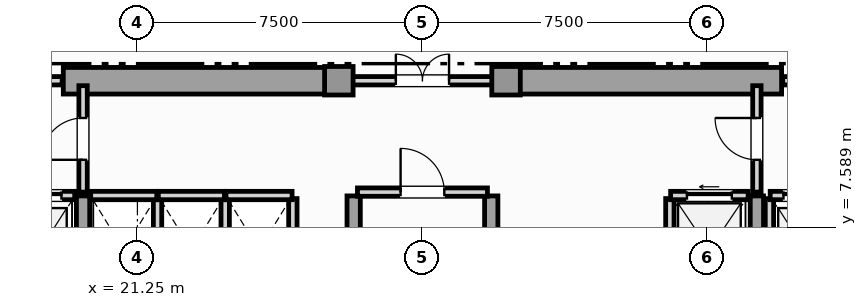
"""IFC4 building model, lengths in metres.
Left out: names, types, materials, properties, quantities, classifications, styles, units other than length and angle.
Written with IfcOpenShell. Run it as: python <this file> out.ifc"""

import sys

from ifc_helpers import new_model, si_unit, direction, frame, frame_2d, origin, origin_2d, place, context, subcontext, project, spatial, rectangle, extrude, element, fill, save


model = new_model("IFC4")
c1 = context("Model", 3, precision=1e-05, world=origin(), true_north=direction((0.0, 1.0)))
c2 = subcontext(c1, "Body", "Model", "MODEL_VIEW")
j1 = project(units=[si_unit("LENGTHUNIT", "METRE"), si_unit("PLANEANGLEUNIT", "RADIAN")], contexts=[c1])
p1 = place(None, origin())
s1 = spatial("IfcSite", under=j1, at=p1, CompositionType="ELEMENT")
p2 = place(p1, origin())
s2 = spatial("IfcBuilding", under=s1, at=p2, CompositionType="ELEMENT")
p3 = place(p2, frame((0.0, 0.0, 145.2)))
s3 = spatial("IfcBuildingStorey", under=s2, at=p3, CompositionType="ELEMENT", Elevation=145.2)
for number, where, z_axis, x_axis in (
    (1, (19.3, 11.45, 0.0), (0.0, 0.0, 1.0), (1.0, 0.0, 0.0)),
    (2, (30.9, 11.45, 0.0), (0.0, 0.0, 1.0), (1.0, 0.0, 0.0)),
):
    element("IfcWall", number, at=place(p3, frame(where, z_axis=z_axis, x_axis=x_axis)), inside=s3, PredefinedType="SHEAR", context=c2, shape_type="SweptSolid", body=[
        extrude(rectangle(XDim=7.3, YDim=0.7, at=frame_2d((3.65, 0.0))), origin(), (0.0, 0.0, 1.0), 3.63),
    ])
for number, where, z_axis, x_axis in (
    (3, (19.82, 0.92, 0.0), (0.0, 0.0, 1.0), (0.0, 1.0, 0.0)),
    (4, (26.94, 0.92, 0.0), (0.0, 0.0, 1.0), (0.0, 1.0, 0.0)),
    (5, (30.56, 0.92, 0.0), (0.0, 0.0, 1.0), (0.0, 1.0, 0.0)),
    (6, (37.55, 0.92, 0.0), (0.0, 0.0, 1.0), (0.0, 1.0, 0.0)),
):
    element("IfcWall", number, at=place(p3, frame(where, z_axis=z_axis, x_axis=x_axis)), inside=s3, PredefinedType="SHEAR", context=c2, shape_type="SweptSolid", body=[
        extrude(rectangle(XDim=7.5, YDim=0.35, at=frame_2d((3.75, 0.0))), origin(), (0.0, 0.0, 1.0), 3.63),
    ])
for number, where, z_axis, x_axis in (
    (7, (26.55, 11.45, 0.0), (0.0, 0.0, 1.0), (1.0, 0.0, 0.0)),
    (8, (30.95, 11.45, 0.0), (0.0, 0.0, 1.0), (1.0, 0.0, 0.0)),
):
    element("IfcColumn", number, at=place(p3, frame(where, z_axis=z_axis, x_axis=x_axis)), inside=s3, PredefinedType="COLUMN", context=c2, shape_type="SweptSolid", body=[
        extrude(rectangle(XDim=0.75, YDim=0.75, at=origin_2d()), origin(), (0.0, 0.0, 1.0), 3.85),
    ])
p4 = place(p3, frame((17.78, 8.43, 0.0), z_axis=(0.0, 0.0, 1.0), x_axis=(1.0, 0.0, 0.0)))
e9 = element("IfcWall", 9, at=p4, inside=s3, PredefinedType="SOLIDWALL", context=c2, shape_type="SweptSolid", body=[
    extrude(rectangle(XDim=1.82, YDim=0.22, at=frame_2d((0.91, 0.0))), origin(), (0.0, 0.0, 1.0), 3.63),
])
p5 = place(p4, frame((0.35, 0.0, 0.0)))
e10 = element("IfcOpeningElement", 10, at=p5, cuts=e9, PredefinedType="OPENING", context=c2, shape_type="SweptSolid", body=[
    extrude(rectangle(XDim=1.12, YDim=2.25, at=frame_2d((0.56, 1.125))), frame((0.0, 0.12, 0.0), z_axis=(0.0, -1.0, 0.0), x_axis=(1.0, 0.0, 0.0)), (0.0, 0.0, 1.0), 0.24),
])
p6 = place(p3, frame((37.88, 5.65, 0.0), z_axis=(0.0, 0.0, 1.0), x_axis=(0.0, 1.0, 0.0)))
e11 = element("IfcWall", 11, at=p6, inside=s3, PredefinedType="SOLIDWALL", context=c2, shape_type="SweptSolid", body=[
    extrude(rectangle(XDim=2.7, YDim=0.22, at=frame_2d((1.35, 0.0))), origin(), (0.0, 0.0, 1.0), 3.63),
])
p7 = place(p3, frame((37.9, 8.43, 0.0), z_axis=(0.0, 0.0, 1.0), x_axis=(1.0, 0.0, 0.0)))
e12 = element("IfcWall", 12, at=p7, inside=s3, PredefinedType="SOLIDWALL", context=c2, shape_type="SweptSolid", body=[
    extrude(rectangle(XDim=1.82, YDim=0.22, at=frame_2d((0.91, 0.0))), origin(), (0.0, 0.0, 1.0), 3.63),
])
p8 = place(p7, frame((0.35, 0.0, 0.0)))
e13 = element("IfcOpeningElement", 13, at=p8, cuts=e12, PredefinedType="OPENING", context=c2, shape_type="SweptSolid", body=[
    extrude(rectangle(XDim=1.12, YDim=2.25, at=frame_2d((0.56, 1.125))), frame((0.0, 0.12, 0.0), z_axis=(0.0, -1.0, 0.0), x_axis=(1.0, 0.0, 0.0)), (0.0, 0.0, 1.0), 0.24),
])
p9 = place(p3, frame((35.26, 5.65, 0.0), z_axis=(0.0, 0.0, 1.0), x_axis=(0.0, 1.0, 0.0)))
e14 = element("IfcWall", 14, at=p9, inside=s3, PredefinedType="SOLIDWALL", context=c2, shape_type="SweptSolid", body=[
    extrude(rectangle(XDim=2.7, YDim=0.22, at=frame_2d((1.35, 0.0))), origin(), (0.0, 0.0, 1.0), 3.63),
])
p10 = place(p3, frame((35.28, 8.43, 0.0), z_axis=(0.0, 0.0, 1.0), x_axis=(1.0, 0.0, 0.0)))
e15 = element("IfcWall", 15, at=p10, inside=s3, PredefinedType="SOLIDWALL", context=c2, shape_type="SweptSolid", body=[
    extrude(rectangle(XDim=2.04, YDim=0.22, at=frame_2d((1.02, 0.0))), origin(), (0.0, 0.0, 1.0), 3.63),
])
p11 = place(p10, frame((0.43, 0.0, 0.0)))
e16 = element("IfcOpeningElement", 16, at=p11, cuts=e15, PredefinedType="OPENING", context=c2, shape_type="SweptSolid", body=[
    extrude(rectangle(XDim=1.18, YDim=2.2, at=frame_2d((0.59, 1.1))), frame((0.0, 0.12, 0.0), z_axis=(0.0, -1.0, 0.0), x_axis=(1.0, 0.0, 0.0)), (0.0, 0.0, 1.0), 0.24),
])
p12 = place(p3, frame((21.78, 5.65, 0.0), z_axis=(0.0, 0.0, 1.0), x_axis=(0.0, 1.0, 0.0)))
e17 = element("IfcWall", 17, at=p12, inside=s3, PredefinedType="SOLIDWALL", context=c2, shape_type="SweptSolid", body=[
    extrude(rectangle(XDim=2.7, YDim=0.22, at=frame_2d((1.35, 0.0))), origin(), (0.0, 0.0, 1.0), 3.63),
])
p13 = place(p3, frame((20.02, 8.43, 0.0), z_axis=(0.0, 0.0, 1.0), x_axis=(1.0, 0.0, 0.0)))
e18 = element("IfcWall", 18, at=p13, inside=s3, PredefinedType="SOLIDWALL", context=c2, shape_type="SweptSolid", body=[
    extrude(rectangle(XDim=1.74, YDim=0.22, at=frame_2d((0.87, 0.0))), origin(), (0.0, 0.0, 1.0), 3.63),
])
p14 = place(p3, frame((23.56, 5.65, 0.0), z_axis=(0.0, 0.0, 1.0), x_axis=(0.0, 1.0, 0.0)))
e19 = element("IfcWall", 19, at=p14, inside=s3, PredefinedType="SOLIDWALL", context=c2, shape_type="SweptSolid", body=[
    extrude(rectangle(XDim=2.7, YDim=0.22, at=frame_2d((1.35, 0.0))), origin(), (0.0, 0.0, 1.0), 3.63),
])
p15 = place(p3, frame((21.8, 8.43, 0.0), z_axis=(0.0, 0.0, 1.0), x_axis=(1.0, 0.0, 0.0)))
e20 = element("IfcWall", 20, at=p15, inside=s3, PredefinedType="SOLIDWALL", context=c2, shape_type="SweptSolid", body=[
    extrude(rectangle(XDim=1.74, YDim=0.22, at=frame_2d((0.87, 0.0))), origin(), (0.0, 0.0, 1.0), 3.63),
])
p16 = place(p3, frame((25.34, 5.65, 0.0), z_axis=(0.0, 0.0, 1.0), x_axis=(0.0, 1.0, 0.0)))
e21 = element("IfcWall", 21, at=p16, inside=s3, PredefinedType="SOLIDWALL", context=c2, shape_type="SweptSolid", body=[
    extrude(rectangle(XDim=2.7, YDim=0.22, at=frame_2d((1.35, 0.0))), origin(), (0.0, 0.0, 1.0), 3.63),
])
p17 = place(p3, frame((23.58, 8.43, 0.0), z_axis=(0.0, 0.0, 1.0), x_axis=(1.0, 0.0, 0.0)))
e22 = element("IfcWall", 22, at=p17, inside=s3, PredefinedType="SOLIDWALL", context=c2, shape_type="SweptSolid", body=[
    extrude(rectangle(XDim=1.74, YDim=0.22, at=frame_2d((0.87, 0.0))), origin(), (0.0, 0.0, 1.0), 3.63),
])
p18 = place(p3, frame((27.04, 8.52, 0.0), z_axis=(0.0, 0.0, 1.0), x_axis=(1.0, 0.0, 0.0)))
e23 = element("IfcWall", 23, at=p18, inside=s3, PredefinedType="SOLIDWALL", context=c2, shape_type="SweptSolid", body=[
    extrude(rectangle(XDim=3.42, YDim=0.22, at=frame_2d((1.71, 0.0))), origin(), (0.0, 0.0, 1.0), 3.63),
])
p19 = place(p18, frame((1.135, 0.0, 0.0)))
e24 = element("IfcOpeningElement", 24, at=p19, cuts=e23, PredefinedType="OPENING", context=c2, shape_type="SweptSolid", body=[
    extrude(rectangle(XDim=1.15, YDim=2.2, at=frame_2d((0.575, 1.1))), frame((0.0, 0.12, 0.0), z_axis=(0.0, -1.0, 0.0), x_axis=(1.0, 0.0, 0.0)), (0.0, 0.0, 1.0), 0.24),
])
p20 = place(p3, frame((19.82, 8.52, 0.0), z_axis=(0.0, 0.0, 1.0), x_axis=(0.0, 1.0, 0.0)))
e25 = element("IfcWall", 25, at=p20, inside=s3, PredefinedType="SOLIDWALL", context=c2, shape_type="SweptSolid", body=[
    extrude(rectangle(XDim=2.8, YDim=0.22, at=frame_2d((1.4, 0.0))), origin(), (0.0, 0.0, 1.0), 3.085),
])
p21 = place(p20, frame((0.85, 0.0, 0.0)))
e26 = element("IfcOpeningElement", 26, at=p21, cuts=e25, PredefinedType="OPENING", context=c2, shape_type="SweptSolid", body=[
    extrude(rectangle(XDim=1.1, YDim=2.2, at=frame_2d((0.55, 1.1))), frame((0.0, 0.12, 0.0), z_axis=(0.0, -1.0, 0.0), x_axis=(1.0, 0.0, 0.0)), (0.0, 0.0, 1.0), 0.24),
])
p22 = place(p3, frame((37.55, 8.52, 0.0), z_axis=(0.0, 0.0, 1.0), x_axis=(0.0, 1.0, 0.0)))
e27 = element("IfcWall", 27, at=p22, inside=s3, PredefinedType="SOLIDWALL", context=c2, shape_type="SweptSolid", body=[
    extrude(rectangle(XDim=2.8, YDim=0.22, at=frame_2d((1.4, 0.0))), origin(), (0.0, 0.0, 1.0), 3.085),
])
p23 = place(p22, frame((0.85, 0.0, 0.0)))
e28 = element("IfcOpeningElement", 28, at=p23, cuts=e27, PredefinedType="OPENING", context=c2, shape_type="SweptSolid", body=[
    extrude(rectangle(XDim=1.1, YDim=2.2, at=frame_2d((0.55, 1.1))), frame((0.0, 0.12, 0.0), z_axis=(0.0, -1.0, 0.0), x_axis=(1.0, 0.0, 0.0)), (0.0, 0.0, 1.0), 0.24),
])
p24 = place(p3, frame((16.23, 11.45, 0.0), z_axis=(0.0, 0.0, 1.0), x_axis=(1.0, 0.0, 0.0)))
e29 = element("IfcWall", 29, at=p24, inside=s3, PredefinedType="SOLIDWALL", context=c2, shape_type="SweptSolid", body=[
    extrude(rectangle(XDim=3.04, YDim=0.22, at=frame_2d((1.52, 0.0))), origin(), (0.0, 0.0, 1.0), 3.63),
])
p25 = place(p24, frame((0.97, 0.0, 0.0)))
e30 = element("IfcOpeningElement", 30, at=p25, cuts=e29, PredefinedType="OPENING", context=c2, shape_type="SweptSolid", body=[
    extrude(rectangle(XDim=1.1, YDim=2.2, at=frame_2d((0.55, 1.1))), frame((0.0, 0.12, 0.0), z_axis=(0.0, -1.0, 0.0), x_axis=(1.0, 0.0, 0.0)), (0.0, 0.0, 1.0), 0.24),
])
p26 = place(p3, frame((26.63, 11.45, 0.0), z_axis=(0.0, 0.0, 1.0), x_axis=(1.0, 0.0, 0.0)))
e31 = element("IfcWall", 31, at=p26, inside=s3, PredefinedType="SOLIDWALL", context=c2, shape_type="SweptSolid", body=[
    extrude(rectangle(XDim=4.24, YDim=0.22, at=frame_2d((2.12, 0.0))), origin(), (0.0, 0.0, 1.0), 3.63),
])
p27 = place(p26, frame((1.42, 0.0, 0.0)))
e32 = element("IfcOpeningElement", 32, at=p27, cuts=e31, PredefinedType="OPENING", context=c2, shape_type="SweptSolid", body=[
    extrude(rectangle(XDim=1.4, YDim=2.2, at=frame_2d((0.7, 1.1))), frame((0.0, 0.12, 0.0), z_axis=(0.0, -1.0, 0.0), x_axis=(1.0, 0.0, 0.0)), (0.0, 0.0, 1.0), 0.24),
])
p28 = place(p3, frame((38.23, 11.45, 0.0), z_axis=(0.0, 0.0, 1.0), x_axis=(1.0, 0.0, 0.0)))
e33 = element("IfcWall", 33, at=p28, inside=s3, PredefinedType="SOLIDWALL", context=c2, shape_type="SweptSolid", body=[
    extrude(rectangle(XDim=3.04, YDim=0.22, at=frame_2d((1.52, 0.0))), origin(), (0.0, 0.0, 1.0), 3.63),
])
p29 = place(p28, frame((0.97, 0.0, 0.0)))
e34 = element("IfcOpeningElement", 34, at=p29, cuts=e33, PredefinedType="OPENING", context=c2, shape_type="SweptSolid", body=[
    extrude(rectangle(XDim=1.1, YDim=2.2, at=frame_2d((0.55, 1.1))), frame((0.0, 0.12, 0.0), z_axis=(0.0, -1.0, 0.0), x_axis=(1.0, 0.0, 0.0)), (0.0, 0.0, 1.0), 0.24),
])
p30 = place(p5, origin())
e35 = element("IfcDoor", 35, at=p30, inside=s3, OperationType="SLIDING_TO_LEFT", PredefinedType="DOOR", context=c2, shape_type="SweptSolid", body=[
    extrude(rectangle(XDim=1.12, YDim=2.25, at=frame_2d((0.56, 1.125))), frame((0.0, 0.025, 0.0), z_axis=(0.0, -1.0, 0.0), x_axis=(1.0, 0.0, 0.0)), (0.0, 0.0, 1.0), 0.05),
])
fill(e10, e35)
p31 = place(p8, origin())
e36 = element("IfcDoor", 36, at=p31, inside=s3, OperationType="SLIDING_TO_RIGHT", PredefinedType="DOOR", context=c2, shape_type="SweptSolid", body=[
    extrude(rectangle(XDim=1.12, YDim=2.25, at=frame_2d((0.56, 1.125))), frame((0.0, 0.025, 0.0), z_axis=(0.0, -1.0, 0.0), x_axis=(1.0, 0.0, 0.0)), (0.0, 0.0, 1.0), 0.05),
])
fill(e13, e36)
p32 = place(p11, origin())
e37 = element("IfcDoor", 37, at=p32, inside=s3, OperationType="SLIDING_TO_LEFT", PredefinedType="DOOR", context=c2, shape_type="SweptSolid", body=[
    extrude(rectangle(XDim=1.18, YDim=2.2, at=frame_2d((0.59, 1.1))), frame((0.0, 0.025, 0.0), z_axis=(0.0, -1.0, 0.0), x_axis=(1.0, 0.0, 0.0)), (0.0, 0.0, 1.0), 0.05),
])
fill(e16, e37)
p33 = place(p19, origin())
e38 = element("IfcDoor", 38, at=p33, inside=s3, OperationType="SINGLE_SWING_LEFT", PredefinedType="DOOR", context=c2, shape_type="SweptSolid", body=[
    extrude(rectangle(XDim=1.15, YDim=2.2, at=frame_2d((0.575, 1.1))), frame((0.0, 0.025, 0.0), z_axis=(0.0, -1.0, 0.0), x_axis=(1.0, 0.0, 0.0)), (0.0, 0.0, 1.0), 0.05),
])
fill(e24, e38)
p34 = place(p21, origin())
e39 = element("IfcDoor", 39, at=p34, inside=s3, OperationType="SINGLE_SWING_LEFT", PredefinedType="DOOR", context=c2, shape_type="SweptSolid", body=[
    extrude(rectangle(XDim=1.1, YDim=2.2, at=frame_2d((0.55, 1.1))), frame((0.0, 0.025, 0.0), z_axis=(0.0, -1.0, 0.0), x_axis=(1.0, 0.0, 0.0)), (0.0, 0.0, 1.0), 0.05),
])
fill(e26, e39)
p35 = place(p23, origin())
e40 = element("IfcDoor", 40, at=p35, inside=s3, OperationType="SINGLE_SWING_RIGHT", PredefinedType="DOOR", context=c2, shape_type="SweptSolid", body=[
    extrude(rectangle(XDim=1.1, YDim=2.2, at=frame_2d((0.55, 1.1))), frame((0.0, 0.025, 0.0), z_axis=(0.0, -1.0, 0.0), x_axis=(1.0, 0.0, 0.0)), (0.0, 0.0, 1.0), 0.05),
])
fill(e28, e40)
p36 = place(p27, origin())
e41 = element("IfcDoor", 41, at=p36, inside=s3, OperationType="DOUBLE_DOOR_SINGLE_SWING", PredefinedType="DOOR", context=c2, shape_type="SweptSolid", body=[
    extrude(rectangle(XDim=1.4, YDim=2.2, at=frame_2d((0.7, 1.1))), frame((0.0, 0.025, 0.0), z_axis=(0.0, -1.0, 0.0), x_axis=(1.0, 0.0, 0.0)), (0.0, 0.0, 1.0), 0.05),
])
fill(e32, e41)
save(model, sys.argv[1])
